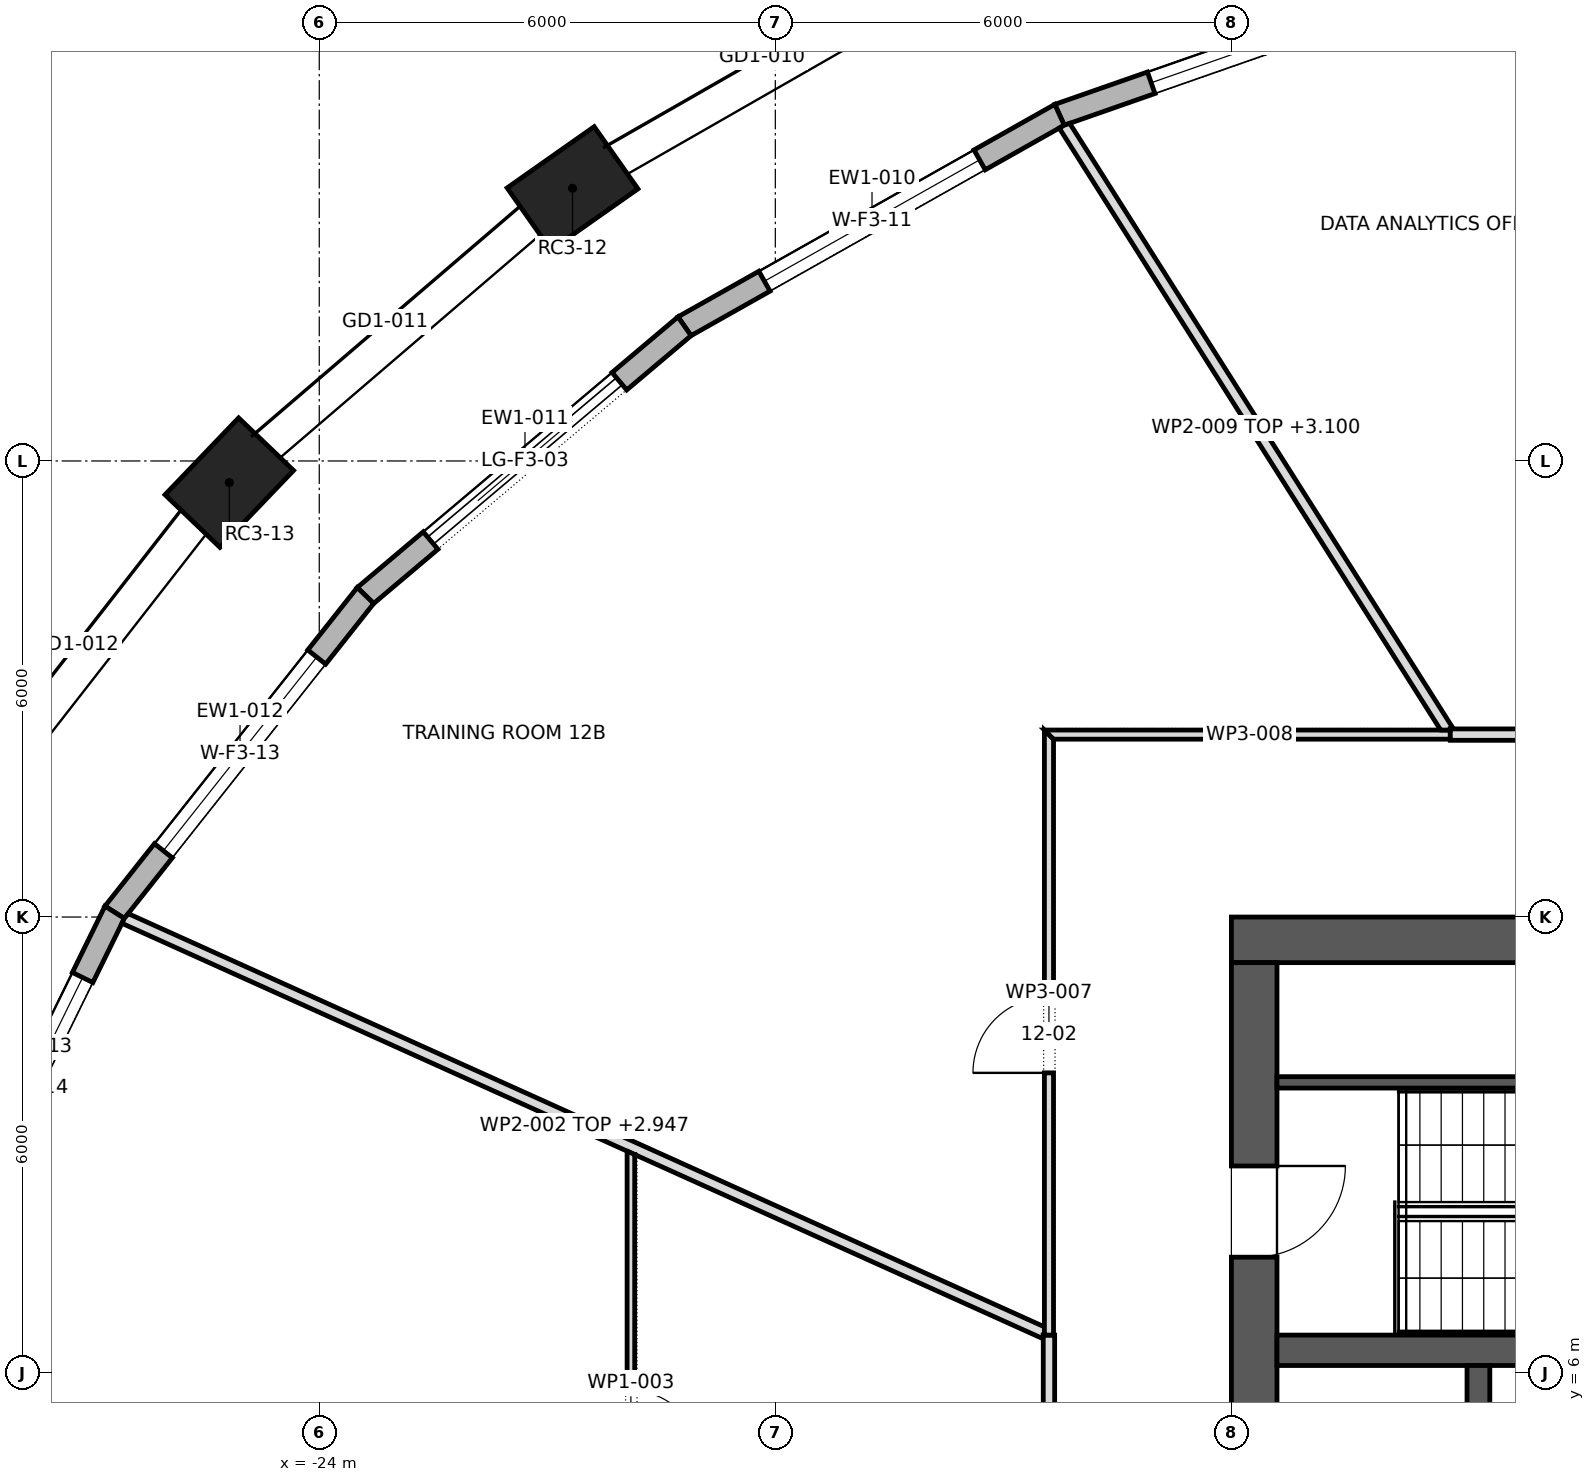
"""IFC4 building model, lengths in metres.
Left out: names, types, materials, properties, quantities, classifications, styles, units other than length and angle.
Written with IfcOpenShell. Run it as: python <this file> out.ifc"""

import sys

from ifc_helpers import new_model, si_unit, direction, frame, frame_2d, origin, origin_2d, place, context, subcontext, project, spatial, polyline, rectangle, outline, extrude, element, fill, save


model = new_model("IFC4")
c1 = context("Model", 3, precision=1e-05, world=origin(), true_north=direction((0.0, 1.0)))
c2 = subcontext(c1, "Body", "Model", "MODEL_VIEW")
j1 = project(units=[si_unit("LENGTHUNIT", "METRE"), si_unit("PLANEANGLEUNIT", "RADIAN")], contexts=[c1])
p1 = place(None, origin())
s1 = spatial("IfcSite", under=j1, at=p1, CompositionType="ELEMENT")
p2 = place(p1, origin())
s2 = spatial("IfcBuilding", under=s1, at=p2, CompositionType="ELEMENT")
p3 = place(p2, frame((0.0, 0.0, 186.9)))
s3 = spatial("IfcBuildingStorey", under=s2, at=p3, CompositionType="ELEMENT", Elevation=186.9)
for number, where, z_axis, x_axis in (
    (1, (-20.668, 21.586, 0.0), (0.0, 0.0, 1.0), (-0.818, -0.575, 0.0)),
    (2, (-25.184, 17.715, 0.0), (0.0, 0.0, 1.0), (-0.692, -0.722, 0.0)),
):
    element("IfcColumn", number, at=place(p3, frame(where, z_axis=z_axis, x_axis=x_axis)), inside=s3, PredefinedType="COLUMN", context=c2, shape_type="SweptSolid", body=[
        extrude(rectangle(XDim=1.4, YDim=1.0, at=origin_2d()), origin(), (0.0, 0.0, 1.0), 4.0),
    ])
p4 = place(p3, frame((-12.0, 11.7, 0.0), z_axis=(0.0, 0.0, 1.0), x_axis=(1.0, 0.0, 0.0)))
e3 = element("IfcWall", 3, at=p4, inside=s3, PredefinedType="SHEAR", context=c2, shape_type="SweptSolid", body=[
    extrude(rectangle(XDim=24.0, YDim=0.6, at=frame_2d((12.0, 0.0))), origin(), (0.0, 0.0, 1.0), 4.0),
])
p5 = place(p4, frame((9.225, 0.0, 0.0)))
e4 = element("IfcOpeningElement", 4, at=p5, cuts=e3, PredefinedType="OPENING", context=c2, shape_type="SweptSolid", body=[
    extrude(rectangle(XDim=0.9, YDim=2.1, at=frame_2d((0.45, 1.05))), frame((0.0, 0.312, 0.0), z_axis=(0.0, -1.0, 0.0), x_axis=(1.0, 0.0, 0.0)), (0.0, 0.0, 1.0), 0.624),
])
p6 = place(p4, frame((10.925, 0.0, 0.0)))
e5 = element("IfcOpeningElement", 5, at=p6, cuts=e3, PredefinedType="OPENING", context=c2, shape_type="SweptSolid", body=[
    extrude(rectangle(XDim=0.8, YDim=2.1, at=frame_2d((0.4, 1.05))), frame((0.0, 0.312, 0.0), z_axis=(0.0, -1.0, 0.0), x_axis=(1.0, 0.0, 0.0)), (0.0, 0.0, 1.0), 0.624),
])
p7 = place(p4, frame((4.2, 0.0, 0.0)))
e6 = element("IfcOpeningElement", 6, at=p7, cuts=e3, PredefinedType="OPENING", context=c2, shape_type="SweptSolid", body=[
    extrude(rectangle(XDim=0.8, YDim=2.1, at=frame_2d((0.4, 1.05))), frame((0.0, 0.312, 0.0), z_axis=(0.0, -1.0, 0.0), x_axis=(1.0, 0.0, 0.0)), (0.0, 0.0, 1.0), 0.624),
])
p8 = place(p4, frame((13.8, 0.0, 0.0)))
e7 = element("IfcOpeningElement", 7, at=p8, cuts=e3, PredefinedType="OPENING", context=c2, shape_type="SweptSolid", body=[
    extrude(rectangle(XDim=0.8, YDim=2.1, at=frame_2d((0.4, 1.05))), frame((0.0, 0.312, 0.0), z_axis=(0.0, -1.0, 0.0), x_axis=(1.0, 0.0, 0.0)), (0.0, 0.0, 1.0), 0.624),
])
p9 = place(p4, frame((16.6, 0.0, 0.0)))
e8 = element("IfcOpeningElement", 8, at=p9, cuts=e3, PredefinedType="OPENING", context=c2, shape_type="SweptSolid", body=[
    extrude(rectangle(XDim=0.8, YDim=2.1, at=frame_2d((0.4, 1.05))), frame((0.0, 0.312, 0.0), z_axis=(0.0, -1.0, 0.0), x_axis=(1.0, 0.0, 0.0)), (0.0, 0.0, 1.0), 0.624),
])
p10 = place(p3, frame((-11.7, -11.4, 0.0), z_axis=(0.0, 0.0, 1.0), x_axis=(0.0, 1.0, 0.0)))
e9 = element("IfcWall", 9, at=p10, inside=s3, PredefinedType="SHEAR", context=c2, shape_type="SweptSolid", body=[
    extrude(rectangle(XDim=22.8, YDim=0.6, at=frame_2d((11.4, 0.0))), origin(), (0.0, 0.0, 1.0), 4.0),
])
p11 = place(p10, frame((10.2, 0.0, 0.0)))
e10 = element("IfcOpeningElement", 10, at=p11, cuts=e9, PredefinedType="OPENING", context=c2, shape_type="SweptSolid", body=[
    extrude(rectangle(XDim=2.4, YDim=2.1, at=frame_2d((1.2, 1.05))), frame((0.0, 0.312, 0.0), z_axis=(0.0, -1.0, 0.0), x_axis=(1.0, 0.0, 0.0)), (0.0, 0.0, 1.0), 0.624),
])
p12 = place(p10, frame((18.925, 0.0, 0.0)))
e11 = element("IfcOpeningElement", 11, at=p12, cuts=e9, PredefinedType="OPENING", context=c2, shape_type="SweptSolid", body=[
    extrude(rectangle(XDim=1.2, YDim=2.1, at=frame_2d((0.6, 1.05))), frame((0.0, 0.312, 0.0), z_axis=(0.0, -1.0, 0.0), x_axis=(1.0, 0.0, 0.0)), (0.0, 0.0, 1.0), 0.624),
])
p13 = place(p10, frame((2.675, 0.0, 0.0)))
e12 = element("IfcOpeningElement", 12, at=p13, cuts=e9, PredefinedType="OPENING", context=c2, shape_type="SweptSolid", body=[
    extrude(rectangle(XDim=1.2, YDim=2.1, at=frame_2d((0.6, 1.05))), frame((0.0, 0.312, 0.0), z_axis=(0.0, -1.0, 0.0), x_axis=(1.0, 0.0, 0.0)), (0.0, 0.0, 1.0), 0.624),
])
p14 = place(p3, frame((-11.4, 6.3, 0.0), z_axis=(0.0, 0.0, 1.0), x_axis=(1.0, 0.0, 0.0)))
e13 = element("IfcWall", 13, at=p14, inside=s3, PredefinedType="SHEAR", context=c2, shape_type="SweptSolid", body=[
    extrude(rectangle(XDim=22.8, YDim=0.4, at=frame_2d((11.4, 0.0))), origin(), (0.0, 0.0, 1.0), 4.0),
])
p15 = place(p14, frame((20.85, 0.0, 0.0)))
e14 = element("IfcOpeningElement", 14, at=p15, cuts=e13, PredefinedType="OPENING", context=c2, shape_type="SweptSolid", body=[
    extrude(rectangle(XDim=1.1, YDim=2.1, at=frame_2d((0.55, 1.05))), frame((0.0, 0.212, 0.0), z_axis=(0.0, -1.0, 0.0), x_axis=(1.0, 0.0, 0.0)), (0.0, 0.0, 1.0), 0.424),
])
p16 = place(p3, frame((-8.75, 3.2, 0.0), z_axis=(0.0, 0.0, 1.0), x_axis=(0.0, 1.0, 0.0)))
e15 = element("IfcWall", 15, at=p16, inside=s3, PredefinedType="SHEAR", context=c2, shape_type="SweptSolid", body=[
    extrude(rectangle(XDim=2.9, YDim=0.3, at=frame_2d((1.45, 0.0))), origin(), (0.0, 0.0, 1.0), 4.0),
])
p17 = place(p3, frame((-8.781, 24.469, 0.0), z_axis=(0.0, 0.0, 1.0), x_axis=(-0.943990724372, -0.329971987144, 0.0)))
e16 = element("IfcWall", 16, at=p17, inside=s3, PredefinedType="STANDARD", context=c2, shape_type="SweptSolid", body=[
    extrude(outline(polyline([(-0.013, -0.15), (5.819, -0.15), (5.792, 0.15), (0.013, 0.15), (-0.013, -0.15)])), origin(), (0.0, 0.0, 1.0), 3.7),
])
p18 = place(p17, frame((1.278, 0.0, 0.6)))
e17 = element("IfcOpeningElement", 17, at=p18, cuts=e16, PredefinedType="OPENING", context=c2, shape_type="SweptSolid", body=[
    extrude(rectangle(XDim=3.25, YDim=2.65, at=frame_2d((1.625, 1.325))), frame((0.0, 0.162, 0.0), z_axis=(0.0, -1.0, 0.0), x_axis=(1.0, 0.0, 0.0)), (0.0, 0.0, 1.0), 0.324),
])
p19 = place(p3, frame((-14.261, 22.554, 0.0), z_axis=(0.0, 0.0, 1.0), x_axis=(-0.871077775545, -0.491145099691, 0.0)))
e18 = element("IfcWall", 18, at=p19, inside=s3, PredefinedType="STANDARD", context=c2, shape_type="SweptSolid", body=[
    extrude(outline(polyline([(-0.013, -0.15), (5.678, -0.15), (5.65, 0.15), (0.013, 0.15), (-0.013, -0.15)])), origin(), (0.0, 0.0, 1.0), 3.7),
])
p20 = place(p19, frame((1.207, 0.0, 0.6)))
e19 = element("IfcOpeningElement", 19, at=p20, cuts=e18, PredefinedType="OPENING", context=c2, shape_type="SweptSolid", body=[
    extrude(rectangle(XDim=3.25, YDim=2.65, at=frame_2d((1.625, 1.325))), frame((0.0, 0.162, 0.0), z_axis=(0.0, -1.0, 0.0), x_axis=(1.0, 0.0, 0.0)), (0.0, 0.0, 1.0), 0.324),
])
p21 = place(p3, frame((-19.195, 19.772, 0.0), z_axis=(0.0, 0.0, 1.0), x_axis=(-0.764238764041, -0.64493341636, 0.0)))
e20 = element("IfcWall", 20, at=p21, inside=s3, PredefinedType="STANDARD", context=c2, shape_type="SweptSolid", body=[
    extrude(outline(polyline([(-0.014, -0.15), (5.508, -0.15), (5.477, 0.15), (0.014, 0.15), (-0.014, -0.15)])), origin(), (0.0, 0.0, 1.0), 3.7),
])
p22 = place(p21, frame((1.121, 0.0, 0.0)))
e21 = element("IfcOpeningElement", 21, at=p22, cuts=e20, PredefinedType="OPENING", context=c2, shape_type="SweptSolid", body=[
    extrude(rectangle(XDim=3.25, YDim=3.25, at=frame_2d((1.625, 1.625))), frame((0.0, 0.162, 0.0), z_axis=(0.0, -1.0, 0.0), x_axis=(1.0, 0.0, 0.0)), (0.0, 0.0, 1.0), 0.324),
])
p23 = place(p3, frame((-23.392, 16.23, 0.0), z_axis=(0.0, 0.0, 1.0), x_axis=(-0.620766467446, -0.78399553117, 0.0)))
e22 = element("IfcWall", 22, at=p23, inside=s3, PredefinedType="STANDARD", context=c2, shape_type="SweptSolid", body=[
    extrude(outline(polyline([(-0.015, -0.15), (5.332, -0.15), (5.3, 0.15), (0.015, 0.15), (-0.015, -0.15)])), origin(), (0.0, 0.0, 1.0), 3.7),
])
p24 = place(p23, frame((1.033, 0.0, 0.6)))
e23 = element("IfcOpeningElement", 23, at=p24, cuts=e22, PredefinedType="OPENING", context=c2, shape_type="SweptSolid", body=[
    extrude(rectangle(XDim=3.25, YDim=2.65, at=frame_2d((1.625, 1.325))), frame((0.0, 0.162, 0.0), z_axis=(0.0, -1.0, 0.0), x_axis=(1.0, 0.0, 0.0)), (0.0, 0.0, 1.0), 0.324),
])
p25 = place(p3, frame((-26.692, 12.062, 0.0), z_axis=(0.0, 0.0, 1.0), x_axis=(-0.440673883676, -0.897667270343, 0.0)))
e24 = element("IfcWall", 24, at=p25, inside=s3, PredefinedType="STANDARD", context=c2, shape_type="SweptSolid", body=[
    extrude(outline(polyline([(-0.016, -0.15), (5.178, -0.15), (5.144, 0.15), (0.016, 0.15), (-0.016, -0.15)])), origin(), (0.0, 0.0, 1.0), 3.7),
])
p26 = place(p25, frame((0.956, 0.0, 0.6)))
e25 = element("IfcOpeningElement", 25, at=p26, cuts=e24, PredefinedType="OPENING", context=c2, shape_type="SweptSolid", body=[
    extrude(rectangle(XDim=3.25, YDim=2.65, at=frame_2d((1.625, 1.325))), frame((0.0, 0.162, 0.0), z_axis=(0.0, -1.0, 0.0), x_axis=(1.0, 0.0, 0.0)), (0.0, 0.0, 1.0), 0.324),
])
p27 = place(p3, frame((-11.4, 9.825, 0.0), z_axis=(0.0, 0.0, 1.0), x_axis=(1.0, 0.0, 0.0)))
e26 = element("IfcWall", 26, at=p27, inside=s3, PredefinedType="SHEAR", context=c2, shape_type="SweptSolid", body=[
    extrude(rectangle(XDim=8.0, YDim=0.15, at=frame_2d((4.0, 0.0))), origin(), (0.0, 0.0, 1.0), 3.7),
])
p28 = place(p3, frame((-26.565, 11.986, 0.0), z_axis=(0.0, 0.0, 1.0), x_axis=(0.911575557789, -0.411132584991, 0.0)))
e27 = element("IfcWall", 27, at=p28, inside=s3, PredefinedType="PARTITIONING", context=c2, shape_type="SweptSolid", body=[
    extrude(outline(polyline([(0.0, -0.075), (1.849, -0.075), (3.698, -0.075), (5.546, -0.075), (7.395, -0.075), (7.399, -0.073), (7.4, -0.075), (9.365, -0.075), (11.331, -0.075), (13.296, -0.075), (13.296, -0.075), (13.276, -0.031), (13.29, -0.024), (13.245, 0.075), (11.356, 0.075), (9.467, 0.075), (7.578, 0.075), (5.689, 0.075), (3.8, 0.075), (1.911, 0.075), (0.022, 0.075), (0.002, -0.003), (0.0, -0.07), (0.0, -0.075)])), origin(), (0.0, 0.0, 1.0), 2.947),
])
p29 = place(p3, frame((-19.9, 1.729, 0.0), z_axis=(0.0, 0.0, 1.0), x_axis=(0.0, 1.0, 0.0)))
e28 = element("IfcWall", 28, at=p29, inside=s3, PredefinedType="PARTITIONING", context=c2, shape_type="SweptSolid", body=[
    extrude(outline(polyline([(0.0, -0.05), (1.787, -0.05), (3.573, -0.05), (5.36, -0.05), (7.146, -0.05), (7.191, 0.049), (7.191, 0.05), (5.396, 0.05), (3.6, 0.05), (1.804, 0.05), (0.008, 0.05), (0.0, -0.048), (0.0, -0.05)])), origin(), (0.0, 0.0, 1.0), 3.7),
])
p30 = place(p29, frame((3.142, 0.0, 0.0)))
e29 = element("IfcOpeningElement", 29, at=p30, cuts=e28, PredefinedType="OPENING", context=c2, shape_type="SweptSolid", body=[
    extrude(rectangle(XDim=0.9, YDim=2.1, at=frame_2d((0.45, 1.05))), frame((0.0, 0.062, 0.0), z_axis=(0.0, -1.0, 0.0), x_axis=(1.0, 0.0, 0.0)), (0.0, 0.0, 1.0), 0.124),
])
p31 = place(p3, frame((-14.4, 1.118, 0.0), z_axis=(0.0, 0.0, 1.0), x_axis=(0.0, 1.0, 0.0)))
e30 = element("IfcWall", 30, at=p31, inside=s3, PredefinedType="PARTITIONING", context=c2, shape_type="SweptSolid", body=[
    extrude(outline(polyline([(5.382, 0.075), (3.642, 0.075), (1.903, 0.075), (0.163, 0.075), (0.0, -0.075), (1.794, -0.075), (3.588, -0.075), (5.382, -0.075), (5.382, 0.075)])), origin(), (0.0, 0.0, 1.0), 3.7),
])
p32 = place(p3, frame((-14.4, 6.5, 0.0), z_axis=(0.0, 0.0, 1.0), x_axis=(0.0, 1.0, 0.0)))
e31 = element("IfcWall", 31, at=p32, inside=s3, PredefinedType="PARTITIONING", context=c2, shape_type="SweptSolid", body=[
    extrude(outline(polyline([(0.0, -0.06), (1.96, -0.06), (3.92, -0.06), (5.88, -0.06), (7.84, -0.06), (7.96, 0.06), (5.97, 0.06), (3.98, 0.06), (1.99, 0.06), (0.0, 0.06), (0.0, -0.06)])), origin(), (0.0, 0.0, 1.0), 3.7),
])
p33 = place(p32, frame((3.45, 0.0, 0.0)))
e32 = element("IfcOpeningElement", 32, at=p33, cuts=e31, PredefinedType="OPENING", context=c2, shape_type="SweptSolid", body=[
    extrude(rectangle(XDim=1.0, YDim=2.1, at=frame_2d((0.5, 1.05))), frame((0.0, 0.072, 0.0), z_axis=(0.0, -1.0, 0.0), x_axis=(1.0, 0.0, 0.0)), (0.0, 0.0, 1.0), 0.144),
])
p34 = place(p3, frame((-14.46, 14.4, 0.0), z_axis=(0.0, 0.0, 1.0), x_axis=(1.0, 0.0, 0.0)))
e33 = element("IfcWall", 33, at=p34, inside=s3, PredefinedType="PARTITIONING", context=c2, shape_type="SweptSolid", body=[
    extrude(outline(polyline([(5.34, 0.06), (3.56, 0.06), (1.78, 0.06), (0.0, 0.06), (0.12, -0.06), (1.86, -0.06), (3.6, -0.06), (5.34, -0.06), (5.34, 0.06)])), origin(), (0.0, 0.0, 1.0), 3.7),
])
p35 = place(p3, frame((-9.142, 14.435, 0.0), z_axis=(0.0, 0.0, 1.0), x_axis=(-0.535245013247, 0.844696854377, 0.0)))
e34 = element("IfcWall", 34, at=p35, inside=s3, PredefinedType="PARTITIONING", context=c2, shape_type="SweptSolid", body=[
    extrude(outline(polyline([(0.0, -0.075), (1.886, -0.075), (3.773, -0.075), (5.659, -0.075), (7.545, -0.075), (9.432, -0.075), (9.449, -0.001), (9.452, 0.069), (9.452, 0.075), (7.577, 0.075), (5.702, 0.075), (3.827, 0.075), (1.952, 0.075), (0.077, 0.075), (0.009, -0.032), (0.022, -0.04), (0.0, -0.075), (0.0, -0.075)])), origin(), (0.0, 0.0, 1.0), 3.1),
])
p36 = place(p3, frame((-9.12, 14.4, 0.0), z_axis=(0.0, 0.0, 1.0), x_axis=(1.0, 0.0, 0.0)))
e35 = element("IfcWall", 35, at=p36, inside=s3, PredefinedType="PARTITIONING", context=c2, shape_type="SweptSolid", body=[
    extrude(outline(polyline([(7.524, -0.075), (7.524, -0.075), (7.356, 0.075), (5.517, 0.075), (3.678, 0.075), (1.839, 0.075), (0.0, 0.075), (0.0, -0.075), (1.881, -0.075), (3.762, -0.075), (5.643, -0.075), (7.524, -0.075)])), origin(), (0.0, 0.0, 1.0), 3.7),
])
p37 = place(p18, origin())
e36 = element("IfcWindow", 36, at=p37, inside=s3, PartitioningType="TRIPLE_PANEL_VERTICAL", PredefinedType="WINDOW", context=c2, shape_type="SweptSolid", body=[
    extrude(rectangle(XDim=3.25, YDim=2.65, at=frame_2d((1.625, 1.325))), frame((0.0, 0.03, 0.0), z_axis=(0.0, -1.0, 0.0), x_axis=(1.0, 0.0, 0.0)), (0.0, 0.0, 1.0), 0.06),
])
fill(e17, e36)
p38 = place(p20, origin())
e37 = element("IfcWindow", 37, at=p38, inside=s3, PartitioningType="TRIPLE_PANEL_VERTICAL", PredefinedType="WINDOW", context=c2, shape_type="SweptSolid", body=[
    extrude(rectangle(XDim=3.25, YDim=2.65, at=frame_2d((1.625, 1.325))), frame((0.0, 0.03, 0.0), z_axis=(0.0, -1.0, 0.0), x_axis=(1.0, 0.0, 0.0)), (0.0, 0.0, 1.0), 0.06),
])
fill(e19, e37)
p39 = place(p22, origin())
e38 = element("IfcDoor", 38, at=p39, inside=s3, OperationType="DOUBLE_DOOR_SLIDING", PredefinedType="DOOR", context=c2, shape_type="SweptSolid", body=[
    extrude(rectangle(XDim=3.25, YDim=3.25, at=frame_2d((1.625, 1.625))), frame((0.0, 0.025, 0.0), z_axis=(0.0, -1.0, 0.0), x_axis=(1.0, 0.0, 0.0)), (0.0, 0.0, 1.0), 0.05),
])
fill(e21, e38)
p40 = place(p24, origin())
e39 = element("IfcWindow", 39, at=p40, inside=s3, PartitioningType="TRIPLE_PANEL_VERTICAL", PredefinedType="WINDOW", context=c2, shape_type="SweptSolid", body=[
    extrude(rectangle(XDim=3.25, YDim=2.65, at=frame_2d((1.625, 1.325))), frame((0.0, 0.03, 0.0), z_axis=(0.0, -1.0, 0.0), x_axis=(1.0, 0.0, 0.0)), (0.0, 0.0, 1.0), 0.06),
])
fill(e23, e39)
p41 = place(p26, origin())
e40 = element("IfcWindow", 40, at=p41, inside=s3, PartitioningType="TRIPLE_PANEL_VERTICAL", PredefinedType="WINDOW", context=c2, shape_type="SweptSolid", body=[
    extrude(rectangle(XDim=3.25, YDim=2.65, at=frame_2d((1.625, 1.325))), frame((0.0, 0.03, 0.0), z_axis=(0.0, -1.0, 0.0), x_axis=(1.0, 0.0, 0.0)), (0.0, 0.0, 1.0), 0.06),
])
fill(e25, e40)
p42 = place(p12, frame((1.2, 0.0, 0.0), z_axis=(0.0, 0.0, 1.0), x_axis=(-1.0, 0.0, 0.0)))
e41 = element("IfcDoor", 41, at=p42, inside=s3, OperationType="SINGLE_SWING_RIGHT", PredefinedType="DOOR", context=c2, shape_type="SweptSolid", body=[
    extrude(rectangle(XDim=1.2, YDim=2.1, at=frame_2d((0.6, 1.05))), frame((0.0, 0.025, 0.0), z_axis=(0.0, -1.0, 0.0), x_axis=(1.0, 0.0, 0.0)), (0.0, 0.0, 1.0), 0.05),
])
fill(e11, e41)
p43 = place(p33, origin())
e42 = element("IfcDoor", 42, at=p43, inside=s3, OperationType="SINGLE_SWING_RIGHT", PredefinedType="DOOR", context=c2, shape_type="SweptSolid", body=[
    extrude(rectangle(XDim=1.0, YDim=2.1, at=frame_2d((0.5, 1.05))), frame((0.0, 0.025, 0.0), z_axis=(0.0, -1.0, 0.0), x_axis=(1.0, 0.0, 0.0)), (0.0, 0.0, 1.0), 0.05),
])
fill(e32, e42)
p44 = place(p30, frame((0.9, 0.0, 0.0), z_axis=(0.0, 0.0, 1.0), x_axis=(-1.0, 0.0, 0.0)))
e43 = element("IfcDoor", 43, at=p44, inside=s3, OperationType="SINGLE_SWING_LEFT", PredefinedType="DOOR", context=c2, shape_type="SweptSolid", body=[
    extrude(rectangle(XDim=0.9, YDim=2.1, at=frame_2d((0.45, 1.05))), frame((0.0, 0.025, 0.0), z_axis=(0.0, -1.0, 0.0), x_axis=(1.0, 0.0, 0.0)), (0.0, 0.0, 1.0), 0.05),
])
fill(e29, e43)
save(model, sys.argv[1])
